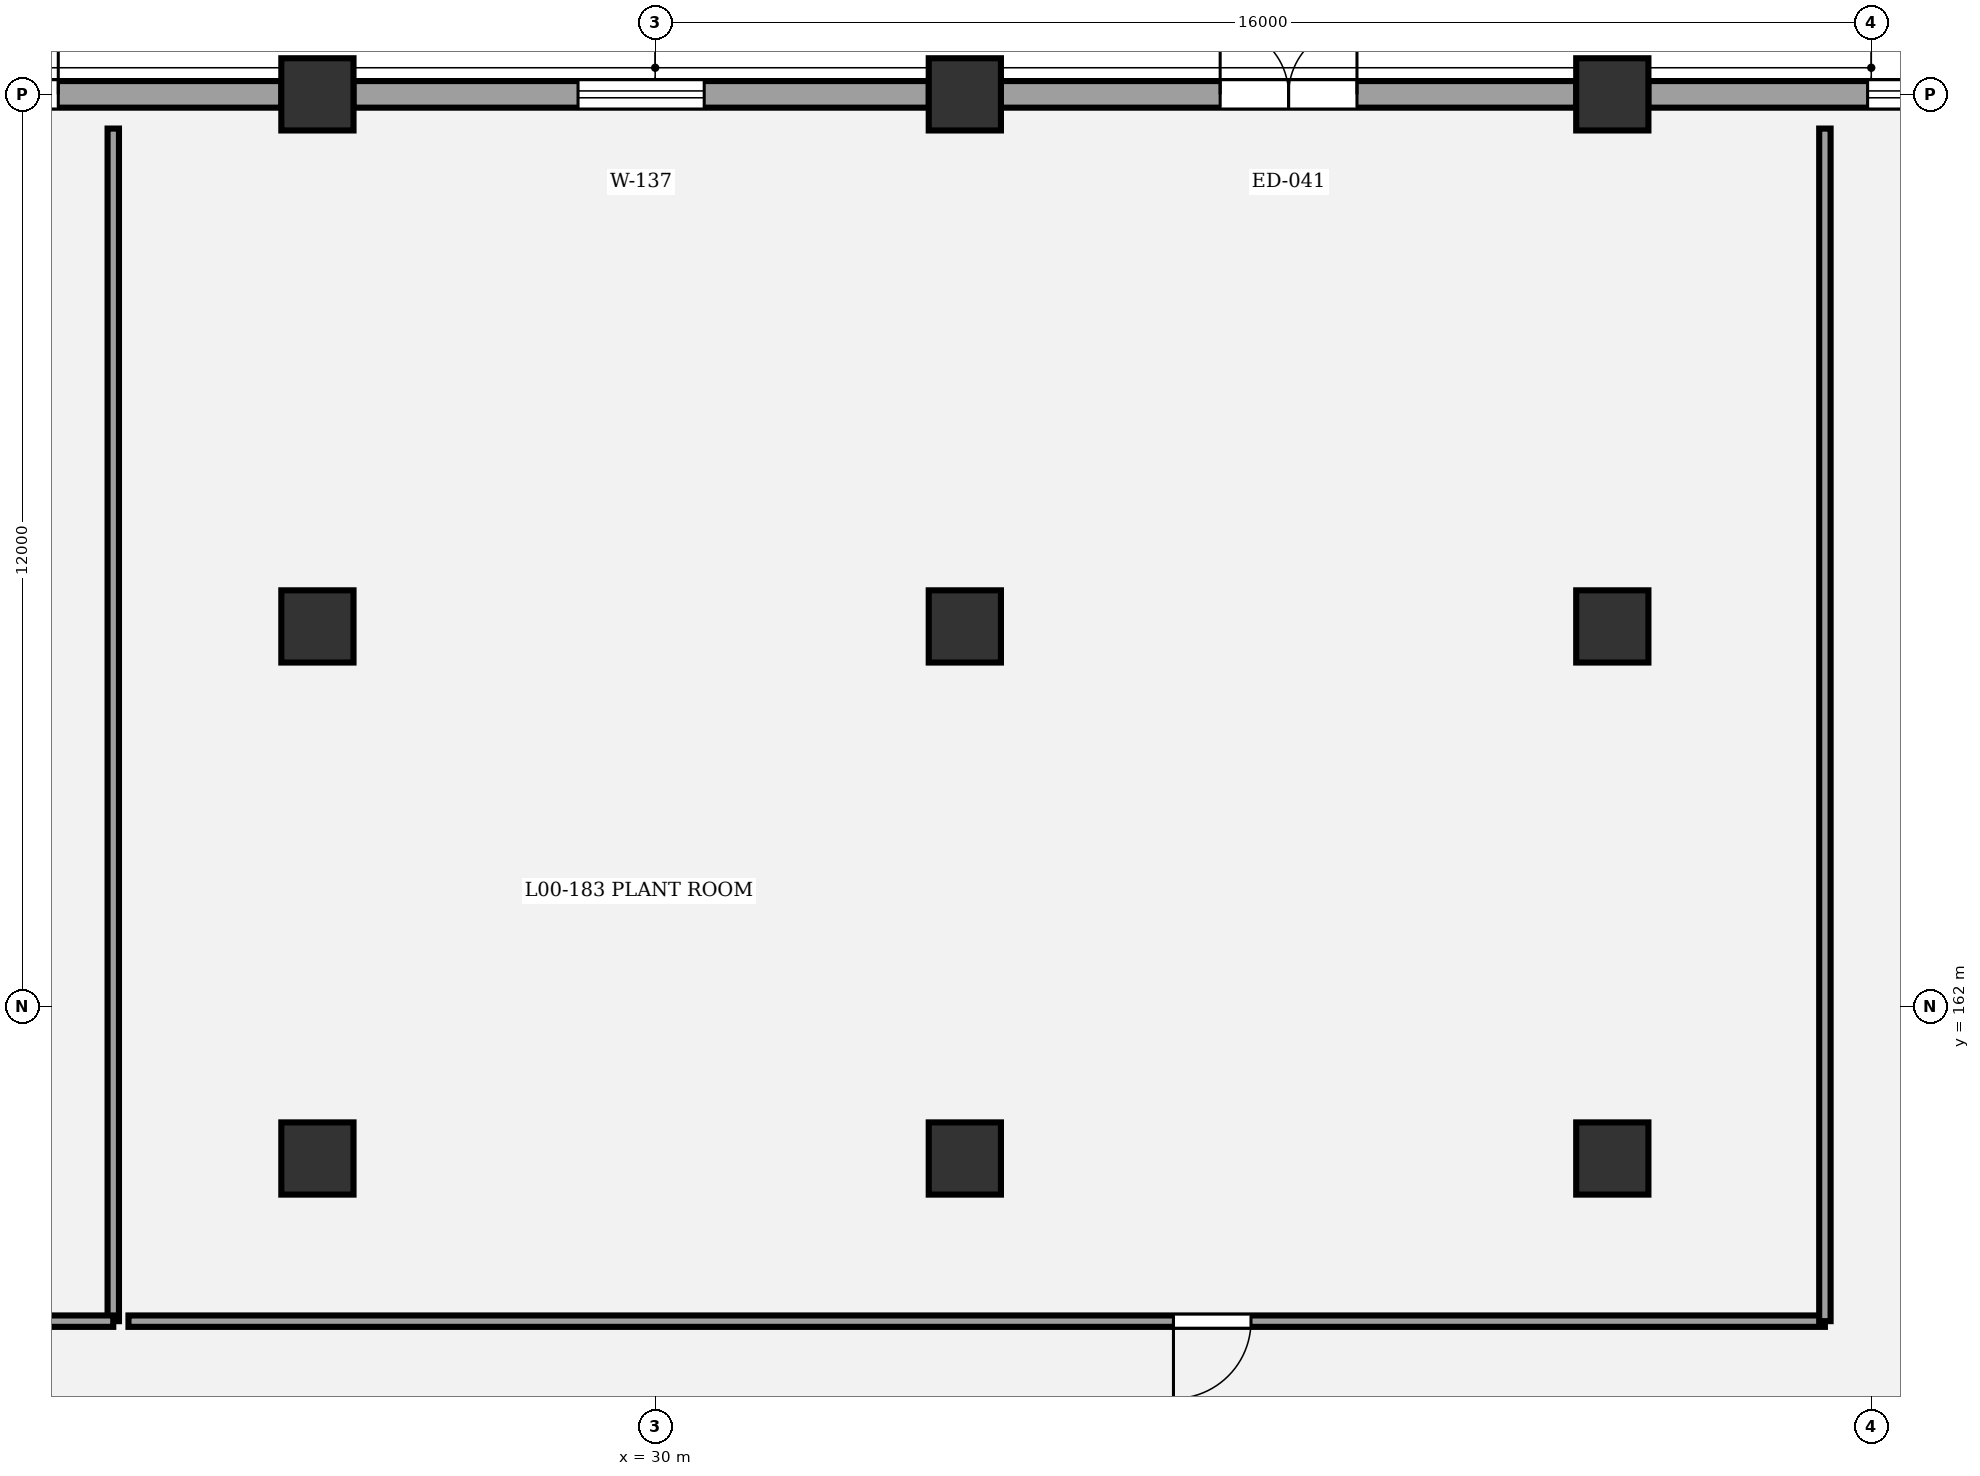
"""IFC4 building model, lengths in metres.
Left out: names, types, materials, properties, quantities, classifications, styles, units other than length and angle.
Written with IfcOpenShell. Run it as: python <this file> out.ifc"""

import sys

from ifc_helpers import new_model, si_unit, direction, frame, frame_2d, origin, origin_2d, place, context, subcontext, project, spatial, rectangle, circle, extrude, element, fill, save


model = new_model("IFC4")
c1 = context("Model", 3, precision=1e-05, world=origin(), true_north=direction((0.0, 1.0)))
c2 = subcontext(c1, "Body", "Model", "MODEL_VIEW")
j1 = project(units=[si_unit("LENGTHUNIT", "METRE"), si_unit("PLANEANGLEUNIT", "RADIAN")], contexts=[c1])
p1 = place(None, origin())
s1 = spatial("IfcSite", under=j1, at=p1, CompositionType="ELEMENT")
p2 = place(p1, origin())
s2 = spatial("IfcBuilding", under=s1, at=p2, CompositionType="ELEMENT")
p3 = place(p2, origin())
s3 = spatial("IfcBuildingStorey", under=s2, at=p3, CompositionType="ELEMENT", Elevation=0.0)
for number, where, z_axis, x_axis in (
    (1, (25.556, 160.0, 0.0), (0.0, 0.0, 1.0), (1.0, 0.0, 0.0)),
    (2, (25.556, 167.0, 0.0), (0.0, 0.0, 1.0), (1.0, 0.0, 0.0)),
    (3, (25.556, 174.0, 0.0), (0.0, 0.0, 1.0), (1.0, 0.0, 0.0)),
    (4, (34.074, 160.0, 0.0), (0.0, 0.0, 1.0), (1.0, 0.0, 0.0)),
    (5, (34.074, 167.0, 0.0), (0.0, 0.0, 1.0), (1.0, 0.0, 0.0)),
    (6, (34.074, 174.0, 0.0), (0.0, 0.0, 1.0), (1.0, 0.0, 0.0)),
    (7, (42.593, 160.0, 0.0), (0.0, 0.0, 1.0), (1.0, 0.0, 0.0)),
    (8, (42.593, 167.0, 0.0), (0.0, 0.0, 1.0), (1.0, 0.0, 0.0)),
    (9, (42.593, 174.0, 0.0), (0.0, 0.0, 1.0), (1.0, 0.0, 0.0)),
):
    element("IfcColumn", number, at=place(p3, frame(where, z_axis=z_axis, x_axis=x_axis)), inside=s3, PredefinedType="COLUMN", context=c2, shape_type="SweptSolid", body=[
        extrude(circle(Radius=0.475, at=origin_2d()), origin(), (0.0, 0.0, 1.0), 5.4),
    ])
p4 = place(p3, frame((17.51, 174.0, 0.0), z_axis=(0.0, 0.0, 1.0), x_axis=(1.0, 0.0, 0.0)))
e10 = element("IfcWall", 10, at=p4, inside=s3, PredefinedType="STANDARD", context=c2, shape_type="SweptSolid", body=[
    extrude(rectangle(XDim=7.573, YDim=0.35, at=frame_2d((3.787, 0.0))), origin(), (0.0, 0.0, 1.0), 4.16),
])
p5 = place(p4, frame((2.937, 0.0, 0.0)))
e11 = element("IfcOpeningElement", 11, at=p5, cuts=e10, PredefinedType="OPENING", context=c2, shape_type="SweptSolid", body=[
    extrude(rectangle(XDim=1.7, YDim=2.35, at=frame_2d((0.85, 1.175))), frame((0.0, 0.185, 0.0), z_axis=(0.0, -1.0, 0.0), x_axis=(1.0, 0.0, 0.0)), (0.0, 0.0, 1.0), 0.37),
])
p6 = place(p3, frame((26.029, 174.0, 0.0), z_axis=(0.0, 0.0, 1.0), x_axis=(1.0, 0.0, 0.0)))
e12 = element("IfcWall", 12, at=p6, inside=s3, PredefinedType="STANDARD", context=c2, shape_type="SweptSolid", body=[
    extrude(rectangle(XDim=7.572, YDim=0.35, at=frame_2d((3.786, 0.0))), origin(), (0.0, 0.0, 1.0), 4.16),
])
p7 = place(p6, frame((2.956, 0.0, 0.9)))
e13 = element("IfcOpeningElement", 13, at=p7, cuts=e12, PredefinedType="OPENING", context=c2, shape_type="SweptSolid", body=[
    extrude(rectangle(XDim=1.66, YDim=1.55, at=frame_2d((0.83, 0.775))), frame((0.0, 0.185, 0.0), z_axis=(0.0, -1.0, 0.0), x_axis=(1.0, 0.0, 0.0)), (0.0, 0.0, 1.0), 0.37),
])
p8 = place(p3, frame((34.547, 174.0, 0.0), z_axis=(0.0, 0.0, 1.0), x_axis=(1.0, 0.0, 0.0)))
e14 = element("IfcWall", 14, at=p8, inside=s3, PredefinedType="STANDARD", context=c2, shape_type="SweptSolid", body=[
    extrude(rectangle(XDim=7.573, YDim=0.35, at=frame_2d((3.787, 0.0))), origin(), (0.0, 0.0, 1.0), 4.16),
])
p9 = place(p8, frame((2.886, 0.0, 0.0)))
e15 = element("IfcOpeningElement", 15, at=p9, cuts=e14, PredefinedType="OPENING", context=c2, shape_type="SweptSolid", body=[
    extrude(rectangle(XDim=1.8, YDim=2.4, at=frame_2d((0.9, 1.2))), frame((0.0, 0.185, 0.0), z_axis=(0.0, -1.0, 0.0), x_axis=(1.0, 0.0, 0.0)), (0.0, 0.0, 1.0), 0.37),
])
p10 = place(p3, frame((43.066, 174.0, 0.0), z_axis=(0.0, 0.0, 1.0), x_axis=(1.0, 0.0, 0.0)))
e16 = element("IfcWall", 16, at=p10, inside=s3, PredefinedType="STANDARD", context=c2, shape_type="SweptSolid", body=[
    extrude(rectangle(XDim=7.572, YDim=0.35, at=frame_2d((3.786, 0.0))), origin(), (0.0, 0.0, 1.0), 4.16),
])
p11 = place(p10, frame((2.886, 0.0, 0.9)))
e17 = element("IfcOpeningElement", 17, at=p11, cuts=e16, PredefinedType="OPENING", context=c2, shape_type="SweptSolid", body=[
    extrude(rectangle(XDim=1.8, YDim=1.55, at=frame_2d((0.9, 0.775))), frame((0.0, 0.185, 0.0), z_axis=(0.0, -1.0, 0.0), x_axis=(1.0, 0.0, 0.0)), (0.0, 0.0, 1.0), 0.37),
])
p12 = place(p3, frame((45.39, 157.86, 0.0), z_axis=(0.0, 0.0, 1.0), x_axis=(-1.0, 0.0, 0.0)))
e18 = element("IfcWall", 18, at=p12, inside=s3, PredefinedType="PARTITIONING", context=c2, shape_type="SweptSolid", body=[
    extrude(rectangle(XDim=22.32, YDim=0.15, at=frame_2d((11.16, 0.0))), origin(), (0.0, 0.0, 1.0), 4.15),
])
p13 = place(p12, frame((7.551, 0.0, 0.0)))
e19 = element("IfcOpeningElement", 19, at=p13, cuts=e18, PredefinedType="OPENING", context=c2, shape_type="SweptSolid", body=[
    extrude(rectangle(XDim=1.02, YDim=2.3, at=frame_2d((0.51, 1.15))), frame((0.0, 0.085, 0.0), z_axis=(0.0, -1.0, 0.0), x_axis=(1.0, 0.0, 0.0)), (0.0, 0.0, 1.0), 0.17),
])
p14 = place(p3, frame((22.87, 173.55, 0.0), z_axis=(0.0, 0.0, 1.0), x_axis=(0.0, -1.0, 0.0)))
e20 = element("IfcWall", 20, at=p14, inside=s3, PredefinedType="PARTITIONING", context=c2, shape_type="SweptSolid", body=[
    extrude(rectangle(XDim=15.69, YDim=0.15, at=frame_2d((7.845, 0.0))), origin(), (0.0, 0.0, 1.0), 4.15),
])
p15 = place(p3, frame((22.87, 157.86, 0.0), z_axis=(0.0, 0.0, 1.0), x_axis=(-1.0, 0.0, 0.0)))
e21 = element("IfcWall", 21, at=p15, inside=s3, PredefinedType="PARTITIONING", context=c2, shape_type="SweptSolid", body=[
    extrude(rectangle(XDim=9.37, YDim=0.15, at=frame_2d((4.685, 0.0))), origin(), (0.0, 0.0, 1.0), 4.15),
])
p16 = place(p3, frame((45.39, 173.55, 0.0), z_axis=(0.0, 0.0, 1.0), x_axis=(0.0, -1.0, 0.0)))
e22 = element("IfcWall", 22, at=p16, inside=s3, PredefinedType="PARTITIONING", context=c2, shape_type="SweptSolid", body=[
    extrude(rectangle(XDim=15.69, YDim=0.15, at=frame_2d((7.845, 0.0))), origin(), (0.0, 0.0, 1.0), 4.15),
])
p17 = place(p5, origin())
e23 = element("IfcDoor", 23, at=p17, inside=s3, OperationType="DOUBLE_DOOR_SINGLE_SWING", PredefinedType="DOOR", context=c2, shape_type="SweptSolid", body=[
    extrude(rectangle(XDim=1.7, YDim=2.35, at=frame_2d((0.85, 1.175))), frame((0.0, 0.025, 0.0), z_axis=(0.0, -1.0, 0.0), x_axis=(1.0, 0.0, 0.0)), (0.0, 0.0, 1.0), 0.05),
])
fill(e11, e23)
p18 = place(p7, origin())
e24 = element("IfcWindow", 24, at=p18, inside=s3, PartitioningType="SINGLE_PANEL", PredefinedType="WINDOW", context=c2, shape_type="SweptSolid", body=[
    extrude(rectangle(XDim=1.66, YDim=1.55, at=frame_2d((0.83, 0.775))), frame((0.0, 0.03, 0.0), z_axis=(0.0, -1.0, 0.0), x_axis=(1.0, 0.0, 0.0)), (0.0, 0.0, 1.0), 0.06),
])
fill(e13, e24)
p19 = place(p9, origin())
e25 = element("IfcDoor", 25, at=p19, inside=s3, OperationType="DOUBLE_DOOR_SINGLE_SWING", PredefinedType="DOOR", context=c2, shape_type="SweptSolid", body=[
    extrude(rectangle(XDim=1.8, YDim=2.4, at=frame_2d((0.9, 1.2))), frame((0.0, 0.025, 0.0), z_axis=(0.0, -1.0, 0.0), x_axis=(1.0, 0.0, 0.0)), (0.0, 0.0, 1.0), 0.05),
])
fill(e15, e25)
p20 = place(p11, origin())
e26 = element("IfcWindow", 26, at=p20, inside=s3, PartitioningType="SINGLE_PANEL", PredefinedType="WINDOW", context=c2, shape_type="SweptSolid", body=[
    extrude(rectangle(XDim=1.8, YDim=1.55, at=frame_2d((0.9, 0.775))), frame((0.0, 0.03, 0.0), z_axis=(0.0, -1.0, 0.0), x_axis=(1.0, 0.0, 0.0)), (0.0, 0.0, 1.0), 0.06),
])
fill(e17, e26)
p21 = place(p13, origin())
e27 = element("IfcDoor", 27, at=p21, inside=s3, OperationType="SINGLE_SWING_RIGHT", PredefinedType="DOOR", context=c2, shape_type="SweptSolid", body=[
    extrude(rectangle(XDim=1.02, YDim=2.3, at=frame_2d((0.51, 1.15))), frame((0.0, 0.025, 0.0), z_axis=(0.0, -1.0, 0.0), x_axis=(1.0, 0.0, 0.0)), (0.0, 0.0, 1.0), 0.05),
])
fill(e19, e27)
save(model, sys.argv[1])
